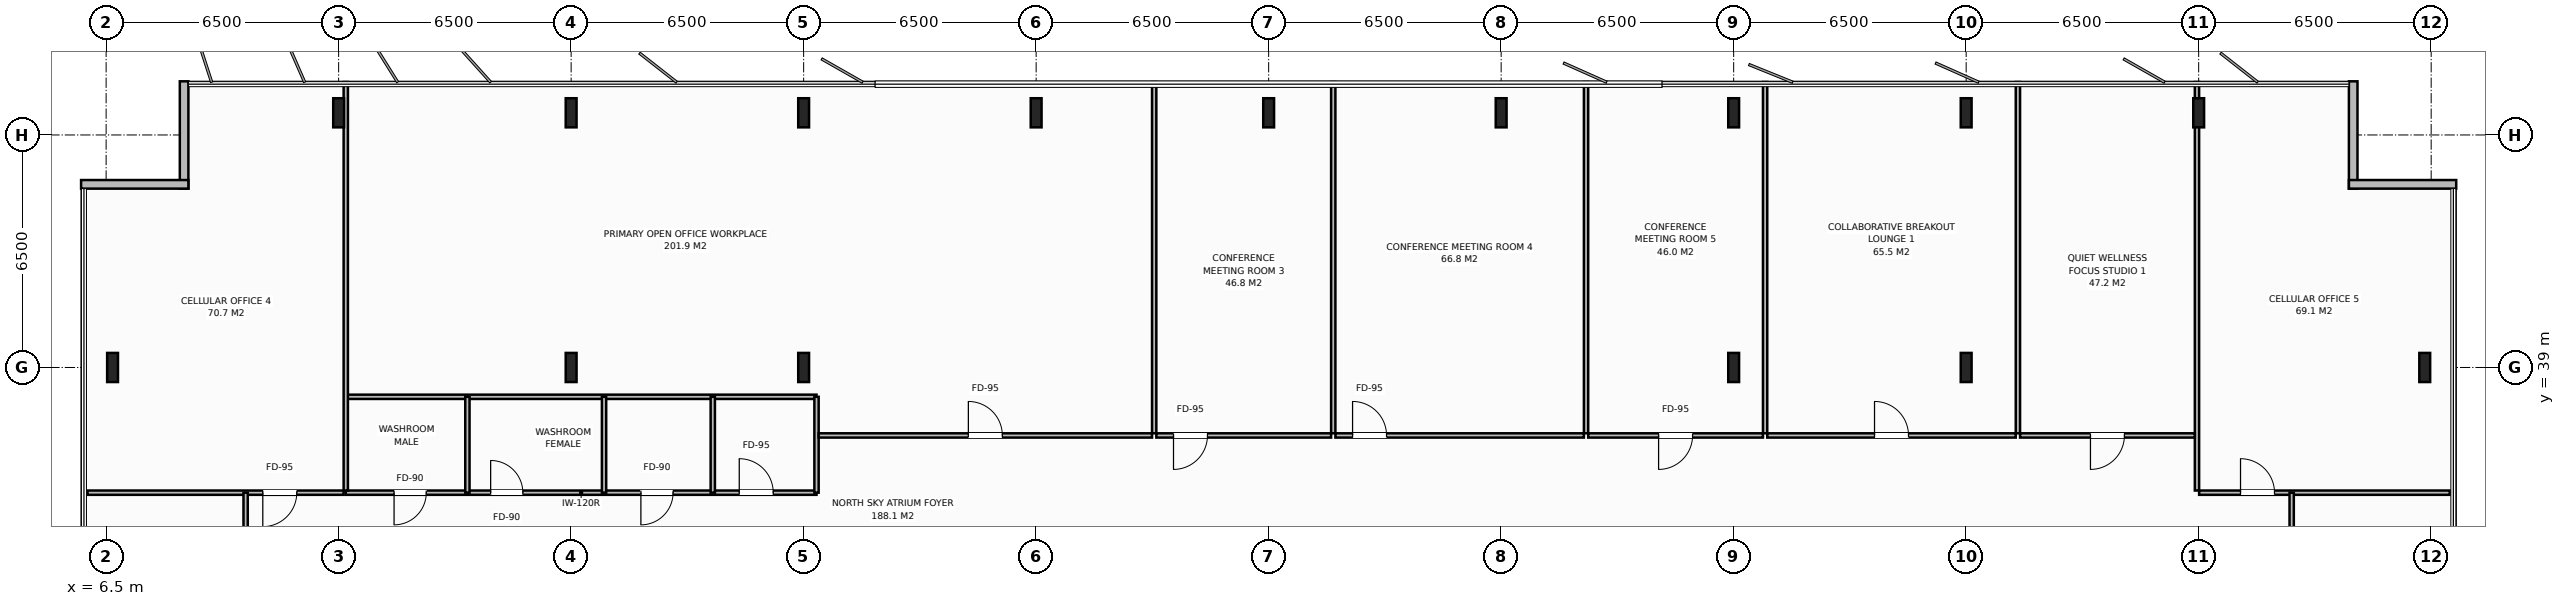
"""IFC4 building model, lengths in metres.
Left out: names, types, materials, properties, quantities, classifications, styles, units other than length and angle.
Written with IfcOpenShell. Run it as: python <this file> out.ifc"""

import sys

from ifc_helpers import new_model, si_unit, direction, frame, frame_2d, origin, origin_2d, place, context, subcontext, project, spatial, rectangle, i_section, extrude, element, fill, save


model = new_model("IFC4")
c1 = context("Model", 3, precision=1e-05, world=origin(), true_north=direction((0.0, 1.0)))
c2 = subcontext(c1, "Body", "Model", "MODEL_VIEW")
j1 = project(units=[si_unit("LENGTHUNIT", "METRE"), si_unit("PLANEANGLEUNIT", "RADIAN")], contexts=[c1])
p1 = place(None, origin())
s1 = spatial("IfcSite", under=j1, at=p1, CompositionType="ELEMENT")
p2 = place(p1, origin())
s2 = spatial("IfcBuilding", under=s1, at=p2, CompositionType="ELEMENT")
p3 = place(p2, frame((0.0, 0.0, 232.8)))
s3 = spatial("IfcBuildingStorey", under=s2, at=p3, CompositionType="ELEMENT", Elevation=232.8)
for number, where, z_axis, x_axis in (
    (1, (19.5, 39.0, 0.0), (0.0, 0.0, 1.0), (1.0, 0.0, 0.0)),
    (2, (58.5, 39.0, 0.0), (0.0, 0.0, 1.0), (1.0, 0.0, 0.0)),
    (3, (26.0, 39.0, 0.0), (0.0, 0.0, 1.0), (1.0, 0.0, 0.0)),
    (4, (52.0, 39.0, 0.0), (0.0, 0.0, 1.0), (1.0, 0.0, 0.0)),
    (5, (13.0, 46.12, 0.0), (0.0, 0.0, 1.0), (1.0, 0.0, 0.0)),
    (6, (19.5, 46.12, 0.0), (0.0, 0.0, 1.0), (1.0, 0.0, 0.0)),
    (7, (26.0, 46.12, 0.0), (0.0, 0.0, 1.0), (1.0, 0.0, 0.0)),
    (8, (32.5, 46.12, 0.0), (0.0, 0.0, 1.0), (1.0, 0.0, 0.0)),
    (9, (39.0, 46.12, 0.0), (0.0, 0.0, 1.0), (1.0, 0.0, 0.0)),
    (10, (45.5, 46.12, 0.0), (0.0, 0.0, 1.0), (1.0, 0.0, 0.0)),
    (11, (52.0, 46.12, 0.0), (0.0, 0.0, 1.0), (1.0, 0.0, 0.0)),
    (12, (58.5, 46.12, 0.0), (0.0, 0.0, 1.0), (1.0, 0.0, 0.0)),
    (13, (65.0, 46.12, 0.0), (0.0, 0.0, 1.0), (1.0, 0.0, 0.0)),
    (14, (6.68, 39.0, 0.0), (0.0, 0.0, 1.0), (1.0, 0.0, 0.0)),
    (15, (71.32, 39.0, 0.0), (0.0, 0.0, 1.0), (1.0, 0.0, 0.0)),
):
    element("IfcColumn", number, at=place(p3, frame(where, z_axis=z_axis, x_axis=x_axis)), inside=s3, PredefinedType="COLUMN", context=c2, shape_type="SweptSolid", body=[
        extrude(i_section(OverallWidth=0.303, OverallDepth=0.814, WebThickness=0.021, FlangeThickness=0.04, at=origin_2d()), origin(), (0.0, 0.0, 1.0), 3.8),
    ])
for number, where, z_axis, x_axis in (
    (16, (8.68, 44.0, 0.0), (0.0, 0.0, 1.0), (0.0, 1.0, 0.0)),
    (17, (5.8, 44.12, 0.0), (0.0, 0.0, 1.0), (1.0, 0.0, 0.0)),
    (18, (69.32, 47.0, 0.0), (0.0, 0.0, 1.0), (0.0, -1.0, 0.0)),
    (19, (69.2, 44.12, 0.0), (0.0, 0.0, 1.0), (1.0, 0.0, 0.0)),
):
    element("IfcWall", number, at=place(p3, frame(where, z_axis=z_axis, x_axis=x_axis)), inside=s3, PredefinedType="STANDARD", context=c2, shape_type="SweptSolid", body=[
        extrude(rectangle(XDim=3.0, YDim=0.24, at=frame_2d((1.5, 0.0))), origin(), (0.0, 0.0, 1.0), 3.58),
    ])
p4 = place(p3, frame((13.2, 35.5, 0.0), z_axis=(0.0, 0.0, 1.0), x_axis=(1.0, 0.0, 0.0)))
e20 = element("IfcWall", 20, at=p4, inside=s3, PredefinedType="PARTITIONING", context=c2, shape_type="SweptSolid", body=[
    extrude(rectangle(XDim=13.16, YDim=0.12, at=frame_2d((6.58, 0.0))), origin(), (0.0, 0.0, 1.0), 3.58),
])
p5 = place(p4, frame((1.35, 0.0, 0.0)))
e21 = element("IfcOpeningElement", 21, at=p5, cuts=e20, PredefinedType="OPENING", context=c2, shape_type="SweptSolid", body=[
    extrude(rectangle(XDim=0.9, YDim=2.15, at=frame_2d((0.45, 1.075))), frame((0.0, 0.07, 0.0), z_axis=(0.0, -1.0, 0.0), x_axis=(1.0, 0.0, 0.0)), (0.0, 0.0, 1.0), 0.14),
])
p6 = place(p4, frame((4.05, 0.0, 0.0)))
e22 = element("IfcOpeningElement", 22, at=p6, cuts=e20, PredefinedType="OPENING", context=c2, shape_type="SweptSolid", body=[
    extrude(rectangle(XDim=0.9, YDim=2.15, at=frame_2d((0.45, 1.075))), frame((0.0, 0.07, 0.0), z_axis=(0.0, -1.0, 0.0), x_axis=(1.0, 0.0, 0.0)), (0.0, 0.0, 1.0), 0.14),
])
p7 = place(p4, frame((8.25, 0.0, 0.0)))
e23 = element("IfcOpeningElement", 23, at=p7, cuts=e20, PredefinedType="OPENING", context=c2, shape_type="SweptSolid", body=[
    extrude(rectangle(XDim=0.9, YDim=2.15, at=frame_2d((0.45, 1.075))), frame((0.0, 0.07, 0.0), z_axis=(0.0, -1.0, 0.0), x_axis=(1.0, 0.0, 0.0)), (0.0, 0.0, 1.0), 0.14),
])
p8 = place(p4, frame((11.0, 0.0, 0.0)))
e24 = element("IfcOpeningElement", 24, at=p8, cuts=e20, PredefinedType="OPENING", context=c2, shape_type="SweptSolid", body=[
    extrude(rectangle(XDim=0.95, YDim=2.15, at=frame_2d((0.475, 1.075))), frame((0.0, 0.07, 0.0), z_axis=(0.0, -1.0, 0.0), x_axis=(1.0, 0.0, 0.0)), (0.0, 0.0, 1.0), 0.14),
])
p9 = place(p3, frame((13.2, 38.18, 0.0), z_axis=(0.0, 0.0, 1.0), x_axis=(1.0, 0.0, 0.0)))
e25 = element("IfcWall", 25, at=p9, inside=s3, PredefinedType="PARTITIONING", context=c2, shape_type="SweptSolid", body=[
    extrude(rectangle(XDim=13.16, YDim=0.12, at=frame_2d((6.58, 0.0))), origin(), (0.0, 0.0, 1.0), 3.58),
])
for number, where, z_axis, x_axis in (
    (26, (16.6, 35.5, 0.0), (0.0, 0.0, 1.0), (0.0, 1.0, 0.0)),
    (27, (20.42, 35.5, 0.0), (0.0, 0.0, 1.0), (0.0, 1.0, 0.0)),
    (28, (23.46, 35.5, 0.0), (0.0, 0.0, 1.0), (0.0, 1.0, 0.0)),
    (29, (26.36, 35.5, 0.0), (0.0, 0.0, 1.0), (0.0, 1.0, 0.0)),
):
    element("IfcWall", number, at=place(p3, frame(where, z_axis=z_axis, x_axis=x_axis)), inside=s3, PredefinedType="PARTITIONING", context=c2, shape_type="SweptSolid", body=[
        extrude(rectangle(XDim=2.68, YDim=0.12, at=frame_2d((1.34, 0.0))), origin(), (0.0, 0.0, 1.0), 3.58),
    ])
p10 = place(p3, frame((13.2, 35.56, 0.0), z_axis=(0.0, 0.0, 1.0), x_axis=(0.0, 1.0, 0.0)))
e30 = element("IfcWall", 30, at=p10, inside=s3, PredefinedType="PARTITIONING", context=c2, shape_type="SweptSolid", body=[
    extrude(rectangle(XDim=11.42, YDim=0.12, at=frame_2d((5.71, 0.0))), origin(), (0.0, 0.0, 1.0), 2.88),
])
p11 = place(p3, frame((5.98, 35.5, 0.0), z_axis=(0.0, 0.0, 1.0), x_axis=(1.0, 0.0, 0.0)))
e31 = element("IfcWall", 31, at=p11, inside=s3, PredefinedType="PARTITIONING", context=c2, shape_type="SweptSolid", body=[
    extrude(rectangle(XDim=7.16, YDim=0.12, at=frame_2d((3.58, 0.0))), origin(), (0.0, 0.0, 1.0), 3.58),
])
p12 = place(p11, frame((4.9, 0.0, 0.0)))
e32 = element("IfcOpeningElement", 32, at=p12, cuts=e31, PredefinedType="OPENING", context=c2, shape_type="SweptSolid", body=[
    extrude(rectangle(XDim=0.95, YDim=2.15, at=frame_2d((0.475, 1.075))), frame((0.0, 0.07, 0.0), z_axis=(0.0, -1.0, 0.0), x_axis=(1.0, 0.0, 0.0)), (0.0, 0.0, 1.0), 0.14),
])
p13 = place(p3, frame((35.8, 37.16, 0.0), z_axis=(0.0, 0.0, 1.0), x_axis=(0.0, 1.0, 0.0)))
e33 = element("IfcWall", 33, at=p13, inside=s3, PredefinedType="PARTITIONING", context=c2, shape_type="SweptSolid", body=[
    extrude(rectangle(XDim=9.82, YDim=0.12, at=frame_2d((4.91, 0.0))), origin(), (0.0, 0.0, 1.0), 3.58),
])
p14 = place(p3, frame((26.42, 37.1, 0.0), z_axis=(0.0, 0.0, 1.0), x_axis=(1.0, 0.0, 0.0)))
e34 = element("IfcWall", 34, at=p14, inside=s3, PredefinedType="PARTITIONING", context=c2, shape_type="SweptSolid", body=[
    extrude(rectangle(XDim=9.32, YDim=0.12, at=frame_2d((4.66, 0.0))), origin(), (0.0, 0.0, 1.0), 3.58),
])
p15 = place(p14, frame((4.185, 0.0, 0.0)))
e35 = element("IfcOpeningElement", 35, at=p15, cuts=e34, PredefinedType="OPENING", context=c2, shape_type="SweptSolid", body=[
    extrude(rectangle(XDim=0.95, YDim=2.15, at=frame_2d((0.475, 1.075))), frame((0.0, 0.07, 0.0), z_axis=(0.0, -1.0, 0.0), x_axis=(1.0, 0.0, 0.0)), (0.0, 0.0, 1.0), 0.14),
])
p16 = place(p3, frame((40.806, 37.16, 0.0), z_axis=(0.0, 0.0, 1.0), x_axis=(0.0, 1.0, 0.0)))
e36 = element("IfcWall", 36, at=p16, inside=s3, PredefinedType="PARTITIONING", context=c2, shape_type="SweptSolid", body=[
    extrude(rectangle(XDim=9.82, YDim=0.12, at=frame_2d((4.91, 0.0))), origin(), (0.0, 0.0, 1.0), 3.58),
])
p17 = place(p3, frame((35.86, 37.1, 0.0), z_axis=(0.0, 0.0, 1.0), x_axis=(1.0, 0.0, 0.0)))
e37 = element("IfcWall", 37, at=p17, inside=s3, PredefinedType="PARTITIONING", context=c2, shape_type="SweptSolid", body=[
    extrude(rectangle(XDim=4.886, YDim=0.12, at=frame_2d((2.443, 0.0))), origin(), (0.0, 0.0, 1.0), 3.58),
])
p18 = place(p17, frame((0.48, 0.0, 0.0)))
e38 = element("IfcOpeningElement", 38, at=p18, cuts=e37, PredefinedType="OPENING", context=c2, shape_type="SweptSolid", body=[
    extrude(rectangle(XDim=0.95, YDim=2.15, at=frame_2d((0.475, 1.075))), frame((0.0, 0.07, 0.0), z_axis=(0.0, -1.0, 0.0), x_axis=(1.0, 0.0, 0.0)), (0.0, 0.0, 1.0), 0.14),
])
p19 = place(p3, frame((47.873, 37.16, 0.0), z_axis=(0.0, 0.0, 1.0), x_axis=(0.0, 1.0, 0.0)))
e39 = element("IfcWall", 39, at=p19, inside=s3, PredefinedType="PARTITIONING", context=c2, shape_type="SweptSolid", body=[
    extrude(rectangle(XDim=9.82, YDim=0.12, at=frame_2d((4.91, 0.0))), origin(), (0.0, 0.0, 1.0), 3.58),
])
p20 = place(p3, frame((40.866, 37.1, 0.0), z_axis=(0.0, 0.0, 1.0), x_axis=(1.0, 0.0, 0.0)))
e40 = element("IfcWall", 40, at=p20, inside=s3, PredefinedType="PARTITIONING", context=c2, shape_type="SweptSolid", body=[
    extrude(rectangle(XDim=6.947, YDim=0.12, at=frame_2d((3.474, 0.0))), origin(), (0.0, 0.0, 1.0), 3.58),
])
p21 = place(p20, frame((0.48, 0.0, 0.0)))
e41 = element("IfcOpeningElement", 41, at=p21, cuts=e40, PredefinedType="OPENING", context=c2, shape_type="SweptSolid", body=[
    extrude(rectangle(XDim=0.95, YDim=2.15, at=frame_2d((0.475, 1.075))), frame((0.0, 0.07, 0.0), z_axis=(0.0, -1.0, 0.0), x_axis=(1.0, 0.0, 0.0)), (0.0, 0.0, 1.0), 0.14),
])
p22 = place(p3, frame((52.879, 37.16, 0.0), z_axis=(0.0, 0.0, 1.0), x_axis=(0.0, 1.0, 0.0)))
e42 = element("IfcWall", 42, at=p22, inside=s3, PredefinedType="PARTITIONING", context=c2, shape_type="SweptSolid", body=[
    extrude(rectangle(XDim=9.82, YDim=0.12, at=frame_2d((4.91, 0.0))), origin(), (0.0, 0.0, 1.0), 3.58),
])
p23 = place(p3, frame((47.933, 37.1, 0.0), z_axis=(0.0, 0.0, 1.0), x_axis=(1.0, 0.0, 0.0)))
e43 = element("IfcWall", 43, at=p23, inside=s3, PredefinedType="PARTITIONING", context=c2, shape_type="SweptSolid", body=[
    extrude(rectangle(XDim=4.886, YDim=0.12, at=frame_2d((2.443, 0.0))), origin(), (0.0, 0.0, 1.0), 3.58),
])
p24 = place(p23, frame((1.968, 0.0, 0.0)))
e44 = element("IfcOpeningElement", 44, at=p24, cuts=e43, PredefinedType="OPENING", context=c2, shape_type="SweptSolid", body=[
    extrude(rectangle(XDim=0.95, YDim=2.15, at=frame_2d((0.475, 1.075))), frame((0.0, 0.07, 0.0), z_axis=(0.0, -1.0, 0.0), x_axis=(1.0, 0.0, 0.0)), (0.0, 0.0, 1.0), 0.14),
])
p25 = place(p3, frame((59.947, 37.16, 0.0), z_axis=(0.0, 0.0, 1.0), x_axis=(0.0, 1.0, 0.0)))
e45 = element("IfcWall", 45, at=p25, inside=s3, PredefinedType="PARTITIONING", context=c2, shape_type="SweptSolid", body=[
    extrude(rectangle(XDim=9.82, YDim=0.12, at=frame_2d((4.91, 0.0))), origin(), (0.0, 0.0, 1.0), 3.58),
])
p26 = place(p3, frame((52.939, 37.1, 0.0), z_axis=(0.0, 0.0, 1.0), x_axis=(1.0, 0.0, 0.0)))
e46 = element("IfcWall", 46, at=p26, inside=s3, PredefinedType="PARTITIONING", context=c2, shape_type="SweptSolid", body=[
    extrude(rectangle(XDim=6.948, YDim=0.12, at=frame_2d((3.474, 0.0))), origin(), (0.0, 0.0, 1.0), 3.58),
])
p27 = place(p26, frame((2.999, 0.0, 0.0)))
e47 = element("IfcOpeningElement", 47, at=p27, cuts=e46, PredefinedType="OPENING", context=c2, shape_type="SweptSolid", body=[
    extrude(rectangle(XDim=0.95, YDim=2.15, at=frame_2d((0.475, 1.075))), frame((0.0, 0.07, 0.0), z_axis=(0.0, -1.0, 0.0), x_axis=(1.0, 0.0, 0.0)), (0.0, 0.0, 1.0), 0.14),
])
p28 = place(p3, frame((64.953, 35.56, 0.0), z_axis=(0.0, 0.0, 1.0), x_axis=(0.0, 1.0, 0.0)))
e48 = element("IfcWall", 48, at=p28, inside=s3, PredefinedType="PARTITIONING", context=c2, shape_type="SweptSolid", body=[
    extrude(rectangle(XDim=11.42, YDim=0.12, at=frame_2d((5.71, 0.0))), origin(), (0.0, 0.0, 1.0), 2.88),
])
p29 = place(p3, frame((60.007, 37.1, 0.0), z_axis=(0.0, 0.0, 1.0), x_axis=(1.0, 0.0, 0.0)))
e49 = element("IfcWall", 49, at=p29, inside=s3, PredefinedType="PARTITIONING", context=c2, shape_type="SweptSolid", body=[
    extrude(rectangle(XDim=4.886, YDim=0.12, at=frame_2d((2.443, 0.0))), origin(), (0.0, 0.0, 1.0), 3.58),
])
p30 = place(p29, frame((1.968, 0.0, 0.0)))
e50 = element("IfcOpeningElement", 50, at=p30, cuts=e49, PredefinedType="OPENING", context=c2, shape_type="SweptSolid", body=[
    extrude(rectangle(XDim=0.95, YDim=2.15, at=frame_2d((0.475, 1.075))), frame((0.0, 0.07, 0.0), z_axis=(0.0, -1.0, 0.0), x_axis=(1.0, 0.0, 0.0)), (0.0, 0.0, 1.0), 0.14),
])
p31 = place(p3, frame((65.013, 35.5, 0.0), z_axis=(0.0, 0.0, 1.0), x_axis=(1.0, 0.0, 0.0)))
e51 = element("IfcWall", 51, at=p31, inside=s3, PredefinedType="PARTITIONING", context=c2, shape_type="SweptSolid", body=[
    extrude(rectangle(XDim=7.007, YDim=0.12, at=frame_2d((3.504, 0.0))), origin(), (0.0, 0.0, 1.0), 3.58),
])
p32 = place(p31, frame((1.157, 0.0, 0.0)))
e52 = element("IfcOpeningElement", 52, at=p32, cuts=e51, PredefinedType="OPENING", context=c2, shape_type="SweptSolid", body=[
    extrude(rectangle(XDim=0.95, YDim=2.15, at=frame_2d((0.475, 1.075))), frame((0.0, 0.07, 0.0), z_axis=(0.0, -1.0, 0.0), x_axis=(1.0, 0.0, 0.0)), (0.0, 0.0, 1.0), 0.14),
])
p33 = place(p3, frame((10.4, 29.167, 0.0), z_axis=(0.0, 0.0, 1.0), x_axis=(0.0, 1.0, 0.0)))
e53 = element("IfcWall", 53, at=p33, inside=s3, PredefinedType="PARTITIONING", context=c2, shape_type="SweptSolid", body=[
    extrude(rectangle(XDim=6.333, YDim=0.12, at=frame_2d((3.167, 0.0))), origin(), (0.0, 0.0, 1.0), 3.58),
])
p34 = place(p33, frame((1.642, 0.0, 0.0)))
e54 = element("IfcOpeningElement", 54, at=p34, cuts=e53, PredefinedType="OPENING", context=c2, shape_type="SweptSolid", body=[
    extrude(rectangle(XDim=0.95, YDim=2.15, at=frame_2d((0.475, 1.075))), frame((0.0, 0.07, 0.0), z_axis=(0.0, -1.0, 0.0), x_axis=(1.0, 0.0, 0.0)), (0.0, 0.0, 1.0), 0.14),
])
p35 = place(p3, frame((67.6, 16.5, 0.0), z_axis=(0.0, 0.0, 1.0), x_axis=(0.0, 1.0, 0.0)))
e55 = element("IfcWall", 55, at=p35, inside=s3, PredefinedType="PARTITIONING", context=c2, shape_type="SweptSolid", body=[
    extrude(rectangle(XDim=19.0, YDim=0.12, at=frame_2d((9.5, 0.0))), origin(), (0.0, 0.0, 1.0), 3.58),
])
p36 = place(p35, frame((9.025, 0.0, 0.0)))
e56 = element("IfcOpeningElement", 56, at=p36, cuts=e55, PredefinedType="OPENING", context=c2, shape_type="SweptSolid", body=[
    extrude(rectangle(XDim=0.95, YDim=2.15, at=frame_2d((0.475, 1.075))), frame((0.0, 0.07, 0.0), z_axis=(0.0, -1.0, 0.0), x_axis=(1.0, 0.0, 0.0)), (0.0, 0.0, 1.0), 0.14),
])
p37 = place(p5, origin())
e57 = element("IfcDoor", 57, at=p37, inside=s3, OperationType="SINGLE_SWING_RIGHT", PredefinedType="DOOR", context=c2, shape_type="SweptSolid", body=[
    extrude(rectangle(XDim=0.9, YDim=2.15, at=frame_2d((0.45, 1.075))), frame((0.0, 0.025, 0.0), z_axis=(0.0, -1.0, 0.0), x_axis=(1.0, 0.0, 0.0)), (0.0, 0.0, 1.0), 0.05),
])
fill(e21, e57)
p38 = place(p6, origin())
e58 = element("IfcDoor", 58, at=p38, inside=s3, OperationType="SINGLE_SWING_LEFT", PredefinedType="DOOR", context=c2, shape_type="SweptSolid", body=[
    extrude(rectangle(XDim=0.9, YDim=2.15, at=frame_2d((0.45, 1.075))), frame((0.0, 0.025, 0.0), z_axis=(0.0, -1.0, 0.0), x_axis=(1.0, 0.0, 0.0)), (0.0, 0.0, 1.0), 0.05),
])
fill(e22, e58)
p39 = place(p7, origin())
e59 = element("IfcDoor", 59, at=p39, inside=s3, OperationType="SINGLE_SWING_RIGHT", PredefinedType="DOOR", context=c2, shape_type="SweptSolid", body=[
    extrude(rectangle(XDim=0.9, YDim=2.15, at=frame_2d((0.45, 1.075))), frame((0.0, 0.025, 0.0), z_axis=(0.0, -1.0, 0.0), x_axis=(1.0, 0.0, 0.0)), (0.0, 0.0, 1.0), 0.05),
])
fill(e23, e59)
p40 = place(p8, origin())
e60 = element("IfcDoor", 60, at=p40, inside=s3, OperationType="SINGLE_SWING_LEFT", PredefinedType="DOOR", context=c2, shape_type="SweptSolid", body=[
    extrude(rectangle(XDim=0.95, YDim=2.15, at=frame_2d((0.475, 1.075))), frame((0.0, 0.025, 0.0), z_axis=(0.0, -1.0, 0.0), x_axis=(1.0, 0.0, 0.0)), (0.0, 0.0, 1.0), 0.05),
])
fill(e24, e60)
p41 = place(p12, origin())
e61 = element("IfcDoor", 61, at=p41, inside=s3, OperationType="SINGLE_SWING_RIGHT", PredefinedType="DOOR", context=c2, shape_type="SweptSolid", body=[
    extrude(rectangle(XDim=0.95, YDim=2.15, at=frame_2d((0.475, 1.075))), frame((0.0, 0.025, 0.0), z_axis=(0.0, -1.0, 0.0), x_axis=(1.0, 0.0, 0.0)), (0.0, 0.0, 1.0), 0.05),
])
fill(e32, e61)
p42 = place(p15, origin())
e62 = element("IfcDoor", 62, at=p42, inside=s3, OperationType="SINGLE_SWING_LEFT", PredefinedType="DOOR", context=c2, shape_type="SweptSolid", body=[
    extrude(rectangle(XDim=0.95, YDim=2.15, at=frame_2d((0.475, 1.075))), frame((0.0, 0.025, 0.0), z_axis=(0.0, -1.0, 0.0), x_axis=(1.0, 0.0, 0.0)), (0.0, 0.0, 1.0), 0.05),
])
fill(e35, e62)
p43 = place(p18, origin())
e63 = element("IfcDoor", 63, at=p43, inside=s3, OperationType="SINGLE_SWING_RIGHT", PredefinedType="DOOR", context=c2, shape_type="SweptSolid", body=[
    extrude(rectangle(XDim=0.95, YDim=2.15, at=frame_2d((0.475, 1.075))), frame((0.0, 0.025, 0.0), z_axis=(0.0, -1.0, 0.0), x_axis=(1.0, 0.0, 0.0)), (0.0, 0.0, 1.0), 0.05),
])
fill(e38, e63)
p44 = place(p21, origin())
e64 = element("IfcDoor", 64, at=p44, inside=s3, OperationType="SINGLE_SWING_LEFT", PredefinedType="DOOR", context=c2, shape_type="SweptSolid", body=[
    extrude(rectangle(XDim=0.95, YDim=2.15, at=frame_2d((0.475, 1.075))), frame((0.0, 0.025, 0.0), z_axis=(0.0, -1.0, 0.0), x_axis=(1.0, 0.0, 0.0)), (0.0, 0.0, 1.0), 0.05),
])
fill(e41, e64)
p45 = place(p24, origin())
e65 = element("IfcDoor", 65, at=p45, inside=s3, OperationType="SINGLE_SWING_RIGHT", PredefinedType="DOOR", context=c2, shape_type="SweptSolid", body=[
    extrude(rectangle(XDim=0.95, YDim=2.15, at=frame_2d((0.475, 1.075))), frame((0.0, 0.025, 0.0), z_axis=(0.0, -1.0, 0.0), x_axis=(1.0, 0.0, 0.0)), (0.0, 0.0, 1.0), 0.05),
])
fill(e44, e65)
p46 = place(p27, origin())
e66 = element("IfcDoor", 66, at=p46, inside=s3, OperationType="SINGLE_SWING_LEFT", PredefinedType="DOOR", context=c2, shape_type="SweptSolid", body=[
    extrude(rectangle(XDim=0.95, YDim=2.15, at=frame_2d((0.475, 1.075))), frame((0.0, 0.025, 0.0), z_axis=(0.0, -1.0, 0.0), x_axis=(1.0, 0.0, 0.0)), (0.0, 0.0, 1.0), 0.05),
])
fill(e47, e66)
p47 = place(p30, origin())
e67 = element("IfcDoor", 67, at=p47, inside=s3, OperationType="SINGLE_SWING_RIGHT", PredefinedType="DOOR", context=c2, shape_type="SweptSolid", body=[
    extrude(rectangle(XDim=0.95, YDim=2.15, at=frame_2d((0.475, 1.075))), frame((0.0, 0.025, 0.0), z_axis=(0.0, -1.0, 0.0), x_axis=(1.0, 0.0, 0.0)), (0.0, 0.0, 1.0), 0.05),
])
fill(e50, e67)
p48 = place(p32, origin())
e68 = element("IfcDoor", 68, at=p48, inside=s3, OperationType="SINGLE_SWING_LEFT", PredefinedType="DOOR", context=c2, shape_type="SweptSolid", body=[
    extrude(rectangle(XDim=0.95, YDim=2.15, at=frame_2d((0.475, 1.075))), frame((0.0, 0.025, 0.0), z_axis=(0.0, -1.0, 0.0), x_axis=(1.0, 0.0, 0.0)), (0.0, 0.0, 1.0), 0.05),
])
fill(e52, e68)
save(model, sys.argv[1])
